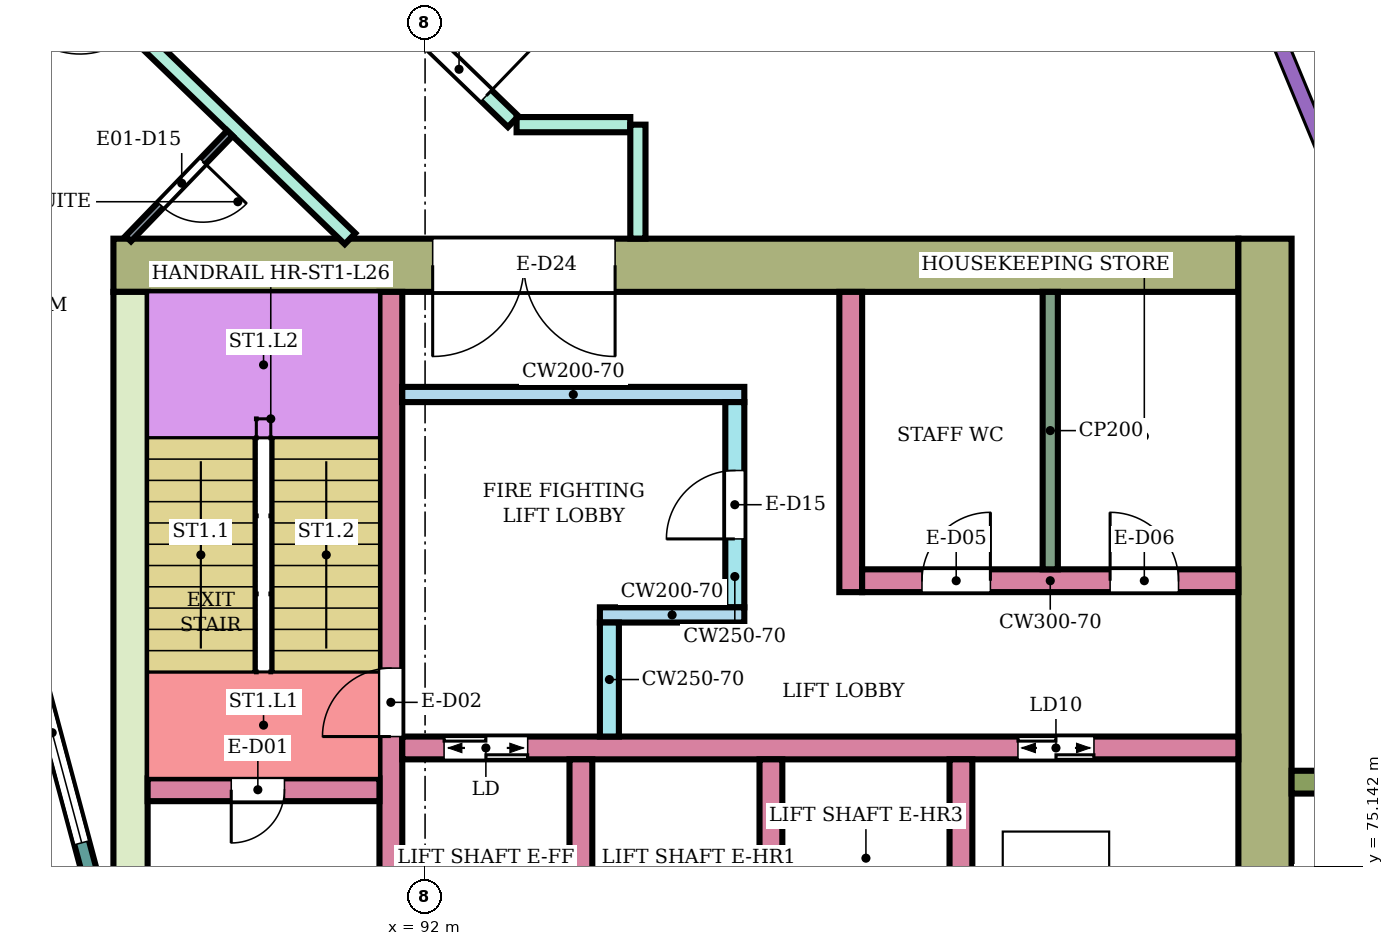
"""IFC4 building model, lengths in metres.
Left out: names, types, materials, properties, quantities, classifications, styles, units other than length and angle.
Written with IfcOpenShell. Run it as: python <this file> out.ifc"""

import sys

from ifc_helpers import new_model, si_unit, direction, frame, frame_2d, origin, place, context, subcontext, project, spatial, rectangle, extrude, element, fill, save


model = new_model("IFC4")
c1 = context("Model", 3, precision=1e-05, world=origin(), true_north=direction((0.0, 1.0)))
c2 = subcontext(c1, "Body", "Model", "MODEL_VIEW")
j1 = project(units=[si_unit("LENGTHUNIT", "METRE"), si_unit("PLANEANGLEUNIT", "RADIAN")], contexts=[c1])
p1 = place(None, origin())
s1 = spatial("IfcSite", under=j1, at=p1, CompositionType="ELEMENT")
p2 = place(p1, origin())
s2 = spatial("IfcBuilding", under=s1, at=p2, CompositionType="ELEMENT")
p3 = place(p2, frame((0.0, 0.0, 114.6)))
s3 = spatial("IfcBuildingStorey", under=s2, at=p3, CompositionType="ELEMENT", Elevation=114.6)
p4 = place(p3, frame((87.9, 83.05, 0.0), z_axis=(0.0, 0.0, 1.0), x_axis=(1.0, 0.0, 0.0)))
e1 = element("IfcWall", 1, at=p4, inside=s3, PredefinedType="SHEAR", context=c2, shape_type="SweptSolid", body=[
    extrude(rectangle(XDim=14.8, YDim=0.7, at=frame_2d((7.4, 0.0))), origin(), (0.0, 0.0, 1.0), 3.58),
])
p5 = place(p4, frame((4.2, 0.0, 0.0)))
e2 = element("IfcOpeningElement", 2, at=p5, cuts=e1, PredefinedType="OPENING", context=c2, shape_type="SweptSolid", body=[
    extrude(rectangle(XDim=2.4, YDim=2.4, at=frame_2d((1.2, 1.2))), frame((0.0, 0.36, 0.0), z_axis=(0.0, -1.0, 0.0), x_axis=(1.0, 0.0, 0.0)), (0.0, 0.0, 1.0), 0.72),
])
p6 = place(p3, frame((88.125, 75.0, 0.0), z_axis=(0.0, 0.0, 1.0), x_axis=(0.0, 1.0, 0.0)))
e3 = element("IfcWall", 3, at=p6, inside=s3, PredefinedType="SHEAR", context=c2, shape_type="SweptSolid", body=[
    extrude(rectangle(XDim=7.7, YDim=0.45, at=frame_2d((3.85, 0.0))), origin(), (0.0, 0.0, 1.0), 3.58),
])
p7 = place(p3, frame((103.05, 66.6, 0.0), z_axis=(0.0, 0.0, 1.0), x_axis=(0.0, 1.0, 0.0)))
e4 = element("IfcWall", 4, at=p7, inside=s3, PredefinedType="SHEAR", context=c2, shape_type="SweptSolid", body=[
    extrude(rectangle(XDim=16.8, YDim=0.7, at=frame_2d((8.4, 0.0))), origin(), (0.0, 0.0, 1.0), 3.58),
])
p8 = place(p3, frame((91.55, 75.0, 0.0), z_axis=(0.0, 0.0, 1.0), x_axis=(0.0, 1.0, 0.0)))
e5 = element("IfcWall", 5, at=p8, inside=s3, PredefinedType="SHEAR", context=c2, shape_type="SweptSolid", body=[
    extrude(rectangle(XDim=7.7, YDim=0.3, at=frame_2d((3.85, 0.0))), origin(), (0.0, 0.0, 1.0), 3.58),
])
p9 = place(p8, frame((1.85, 0.0, 0.0)))
e6 = element("IfcOpeningElement", 6, at=p9, cuts=e5, PredefinedType="OPENING", context=c2, shape_type="SweptSolid", body=[
    extrude(rectangle(XDim=0.9, YDim=2.1, at=frame_2d((0.45, 1.05))), frame((0.0, 0.16, 0.0), z_axis=(0.0, -1.0, 0.0), x_axis=(1.0, 0.0, 0.0)), (0.0, 0.0, 1.0), 0.32),
])
p10 = place(p3, frame((88.35, 76.15, 0.0), z_axis=(0.0, 0.0, 1.0), x_axis=(1.0, 0.0, 0.0)))
e7 = element("IfcWall", 7, at=p10, inside=s3, PredefinedType="SHEAR", context=c2, shape_type="SweptSolid", body=[
    extrude(rectangle(XDim=3.05, YDim=0.3, at=frame_2d((1.525, 0.0))), origin(), (0.0, 0.0, 1.0), 3.58),
])
p11 = place(p10, frame((1.1, 0.0, 0.0)))
e8 = element("IfcOpeningElement", 8, at=p11, cuts=e7, PredefinedType="OPENING", context=c2, shape_type="SweptSolid", body=[
    extrude(rectangle(XDim=0.7, YDim=2.0, at=frame_2d((0.35, 1.0))), frame((0.0, 0.16, 0.0), z_axis=(0.0, -1.0, 0.0), x_axis=(1.0, 0.0, 0.0)), (0.0, 0.0, 1.0), 0.32),
])
p12 = place(p3, frame((91.7, 76.7, 0.0), z_axis=(0.0, 0.0, 1.0), x_axis=(1.0, 0.0, 0.0)))
e9 = element("IfcWall", 9, at=p12, inside=s3, PredefinedType="SHEAR", context=c2, shape_type="SweptSolid", body=[
    extrude(rectangle(XDim=11.0, YDim=0.3, at=frame_2d((5.5, 0.0))), origin(), (0.0, 0.0, 1.0), 3.58),
])
p13 = place(p12, frame((0.55, 0.0, 0.0)))
e10 = element("IfcOpeningElement", 10, at=p13, cuts=e9, PredefinedType="OPENING", context=c2, shape_type="SweptSolid", body=[
    extrude(rectangle(XDim=1.1, YDim=2.1, at=frame_2d((0.55, 1.05))), frame((0.0, 0.16, 0.0), z_axis=(0.0, -1.0, 0.0), x_axis=(1.0, 0.0, 0.0)), (0.0, 0.0, 1.0), 0.32),
])
p14 = place(p12, frame((8.1, 0.0, 0.0)))
e11 = element("IfcOpeningElement", 11, at=p14, cuts=e9, PredefinedType="OPENING", context=c2, shape_type="SweptSolid", body=[
    extrude(rectangle(XDim=1.0, YDim=2.1, at=frame_2d((0.5, 1.05))), frame((0.0, 0.16, 0.0), z_axis=(0.0, -1.0, 0.0), x_axis=(1.0, 0.0, 0.0)), (0.0, 0.0, 1.0), 0.32),
])
for number, where, z_axis, x_axis in (
    (12, (94.05, 74.0, 0.0), (0.0, 0.0, 1.0), (0.0, 1.0, 0.0)),
    (13, (96.55, 74.0, 0.0), (0.0, 0.0, 1.0), (0.0, 1.0, 0.0)),
    (14, (99.05, 74.0, 0.0), (0.0, 0.0, 1.0), (0.0, 1.0, 0.0)),
):
    element("IfcWall", number, at=place(p3, frame(where, z_axis=z_axis, x_axis=x_axis)), inside=s3, PredefinedType="SHEAR", context=c2, shape_type="SweptSolid", body=[
        extrude(rectangle(XDim=2.55, YDim=0.3, at=frame_2d((1.275, 0.0))), origin(), (0.0, 0.0, 1.0), 3.58),
    ])
p15 = place(p3, frame((91.7, 81.35, 0.0), z_axis=(0.0, 0.0, 1.0), x_axis=(1.0, 0.0, 0.0)))
e15 = element("IfcWall", 15, at=p15, inside=s3, PredefinedType="SHEAR", context=c2, shape_type="SweptSolid", body=[
    extrude(rectangle(XDim=4.5, YDim=0.2, at=frame_2d((2.25, 0.0))), origin(), (0.0, 0.0, 1.0), 3.58),
])
p16 = place(p3, frame((96.075, 78.55, 0.0), z_axis=(0.0, 0.0, 1.0), x_axis=(0.0, 1.0, 0.0)))
e16 = element("IfcWall", 16, at=p16, inside=s3, PredefinedType="SHEAR", context=c2, shape_type="SweptSolid", body=[
    extrude(rectangle(XDim=2.7, YDim=0.25, at=frame_2d((1.35, 0.0))), origin(), (0.0, 0.0, 1.0), 3.58),
])
p17 = place(p16, frame((0.9, 0.0, 0.0)))
e17 = element("IfcOpeningElement", 17, at=p17, cuts=e16, PredefinedType="OPENING", context=c2, shape_type="SweptSolid", body=[
    extrude(rectangle(XDim=0.9, YDim=2.1, at=frame_2d((0.45, 1.05))), frame((0.0, 0.135, 0.0), z_axis=(0.0, -1.0, 0.0), x_axis=(1.0, 0.0, 0.0)), (0.0, 0.0, 1.0), 0.27),
])
p18 = place(p3, frame((94.3, 78.45, 0.0), z_axis=(0.0, 0.0, 1.0), x_axis=(1.0, 0.0, 0.0)))
e18 = element("IfcWall", 18, at=p18, inside=s3, PredefinedType="SHEAR", context=c2, shape_type="SweptSolid", body=[
    extrude(rectangle(XDim=1.9, YDim=0.2, at=frame_2d((0.95, 0.0))), origin(), (0.0, 0.0, 1.0), 3.58),
])
p19 = place(p3, frame((94.425, 76.85, 0.0), z_axis=(0.0, 0.0, 1.0), x_axis=(0.0, 1.0, 0.0)))
e19 = element("IfcWall", 19, at=p19, inside=s3, PredefinedType="SHEAR", context=c2, shape_type="SweptSolid", body=[
    extrude(rectangle(XDim=1.5, YDim=0.25, at=frame_2d((0.75, 0.0))), origin(), (0.0, 0.0, 1.0), 3.58),
])
p20 = place(p3, frame((97.6, 78.75, 0.0), z_axis=(0.0, 0.0, 1.0), x_axis=(0.0, 1.0, 0.0)))
e20 = element("IfcWall", 20, at=p20, inside=s3, PredefinedType="SHEAR", context=c2, shape_type="SweptSolid", body=[
    extrude(rectangle(XDim=3.95, YDim=0.3, at=frame_2d((1.975, 0.0))), origin(), (0.0, 0.0, 1.0), 3.58),
])
p21 = place(p3, frame((97.75, 78.9, 0.0), z_axis=(0.0, 0.0, 1.0), x_axis=(1.0, 0.0, 0.0)))
e21 = element("IfcWall", 21, at=p21, inside=s3, PredefinedType="SHEAR", context=c2, shape_type="SweptSolid", body=[
    extrude(rectangle(XDim=4.95, YDim=0.3, at=frame_2d((2.475, 0.0))), origin(), (0.0, 0.0, 1.0), 3.58),
])
p22 = place(p21, frame((0.788, 0.0, 0.0)))
e22 = element("IfcOpeningElement", 22, at=p22, cuts=e21, PredefinedType="OPENING", context=c2, shape_type="SweptSolid", body=[
    extrude(rectangle(XDim=0.9, YDim=2.1, at=frame_2d((0.45, 1.05))), frame((0.0, 0.16, 0.0), z_axis=(0.0, -1.0, 0.0), x_axis=(1.0, 0.0, 0.0)), (0.0, 0.0, 1.0), 0.32),
])
p23 = place(p21, frame((3.262, 0.0, 0.0)))
e23 = element("IfcOpeningElement", 23, at=p23, cuts=e21, PredefinedType="OPENING", context=c2, shape_type="SweptSolid", body=[
    extrude(rectangle(XDim=0.9, YDim=2.1, at=frame_2d((0.45, 1.05))), frame((0.0, 0.16, 0.0), z_axis=(0.0, -1.0, 0.0), x_axis=(1.0, 0.0, 0.0)), (0.0, 0.0, 1.0), 0.32),
])
p24 = place(p3, frame((103.4, 76.25, 0.0), z_axis=(0.0, 0.0, 1.0), x_axis=(1.0, 0.0, 0.0)))
e24 = element("IfcWall", 24, at=p24, inside=s3, PredefinedType="NOTDEFINED", context=c2, shape_type="SweptSolid", body=[
    extrude(rectangle(XDim=2.416, YDim=0.3, at=frame_2d((1.208, 0.0))), origin(), (0.0, 0.0, 1.0), 3.9),
])
p25 = place(p3, frame((87.604, 75.0, 0.0), z_axis=(0.0, 0.0, 1.0), x_axis=(-0.258789828301, 0.965933654434, 0.0)))
e25 = element("IfcWall", 25, at=p25, inside=s3, PredefinedType="NOTDEFINED", context=c2, shape_type="SweptSolid", body=[
    extrude(rectangle(XDim=3.936, YDim=0.2, at=frame_2d((1.968, 0.0))), origin(), (0.0, 0.0, 1.0), 3.9),
])
p26 = place(p25, frame((0.468, 0.0, 0.9)))
e26 = element("IfcOpeningElement", 26, at=p26, cuts=e25, PredefinedType="OPENING", context=c2, shape_type="SweptSolid", body=[
    extrude(rectangle(XDim=3.0, YDim=2.3, at=frame_2d((1.5, 1.15))), frame((0.0, 0.11, 0.0), z_axis=(0.0, -1.0, 0.0), x_axis=(1.0, 0.0, 0.0)), (0.0, 0.0, 1.0), 0.22),
])
p27 = place(p3, frame((87.064, 87.211, 0.0), z_axis=(0.0, 0.0, 1.0), x_axis=(0.719540958932, -0.694450004262, 0.0)))
e27 = element("IfcWall", 27, at=p27, inside=s3, PredefinedType="PARTITIONING", context=c2, shape_type="SweptSolid", body=[
    extrude(rectangle(XDim=5.488, YDim=0.2, at=frame_2d((2.744, 0.0))), origin(), (0.0, 0.0, 1.0), 3.45),
])
p28 = place(p27, frame((0.55, 0.0, 0.0)))
e28 = element("IfcOpeningElement", 28, at=p28, cuts=e27, PredefinedType="OPENING", context=c2, shape_type="SweptSolid", body=[
    extrude(rectangle(XDim=1.0, YDim=2.1, at=frame_2d((0.5, 1.05))), frame((0.0, 0.11, 0.0), z_axis=(0.0, -1.0, 0.0), x_axis=(1.0, 0.0, 0.0)), (0.0, 0.0, 1.0), 0.22),
])
p29 = place(p3, frame((88.466, 89.473, 0.0), z_axis=(0.0, 0.0, 1.0), x_axis=(0.719346014649, -0.694651935295, 0.0)))
e29 = element("IfcWall", 29, at=p29, inside=s3, PredefinedType="PARTITIONING", context=c2, shape_type="SweptSolid", body=[
    extrude(rectangle(XDim=6.525, YDim=0.2, at=frame_2d((3.263, 0.0))), origin(), (0.0, 0.0, 1.0), 3.45),
])
p30 = place(p29, frame((5.034, 0.0, 0.0)))
e30 = element("IfcOpeningElement", 30, at=p30, cuts=e29, PredefinedType="OPENING", context=c2, shape_type="SweptSolid", body=[
    extrude(rectangle(XDim=1.0, YDim=2.1, at=frame_2d((0.5, 1.05))), frame((0.0, 0.11, 0.0), z_axis=(0.0, -1.0, 0.0), x_axis=(1.0, 0.0, 0.0)), (0.0, 0.0, 1.0), 0.22),
])
p31 = place(p3, frame((93.204, 84.9, 0.0), z_axis=(0.0, 0.0, 1.0), x_axis=(1.0, 0.0, 0.0)))
e31 = element("IfcWall", 31, at=p31, inside=s3, PredefinedType="PARTITIONING", context=c2, shape_type="SweptSolid", body=[
    extrude(rectangle(XDim=1.496, YDim=0.2, at=frame_2d((0.748, 0.0))), origin(), (0.0, 0.0, 1.0), 3.45),
])
p32 = place(p3, frame((94.8, 83.401, 0.0), z_axis=(0.0, 0.0, 1.0), x_axis=(0.0, 1.0, 0.0)))
e32 = element("IfcWall", 32, at=p32, inside=s3, PredefinedType="PARTITIONING", context=c2, shape_type="SweptSolid", body=[
    extrude(rectangle(XDim=1.499, YDim=0.2, at=frame_2d((0.75, 0.0))), origin(), (0.0, 0.0, 1.0), 3.45),
])
p33 = place(p3, frame((88.095, 83.4, 0.0), z_axis=(0.0, 0.0, 1.0), x_axis=(0.694447472534, 0.719543402368, 0.0)))
e33 = element("IfcWall", 33, at=p33, inside=s3, PredefinedType="PARTITIONING", context=c2, shape_type="SweptSolid", body=[
    extrude(rectangle(XDim=1.926, YDim=0.1, at=frame_2d((0.963, 0.0))), origin(), (0.0, 0.0, 1.0), 3.45),
])
p34 = place(p33, frame((0.613, 0.0, 0.0)))
e34 = element("IfcOpeningElement", 34, at=p34, cuts=e33, PredefinedType="OPENING", context=c2, shape_type="SweptSolid", body=[
    extrude(rectangle(XDim=0.8, YDim=2.1, at=frame_2d((0.4, 1.05))), frame((0.0, 0.06, 0.0), z_axis=(0.0, -1.0, 0.0), x_axis=(1.0, 0.0, 0.0)), (0.0, 0.0, 1.0), 0.12),
])
p35 = place(p3, frame((100.225, 79.05, 0.0), z_axis=(0.0, 0.0, 1.0), x_axis=(0.0, 1.0, 0.0)))
e35 = element("IfcWall", 35, at=p35, inside=s3, PredefinedType="PARTITIONING", context=c2, shape_type="SweptSolid", body=[
    extrude(rectangle(XDim=3.65, YDim=0.2, at=frame_2d((1.825, 0.0))), origin(), (0.0, 0.0, 1.0), 3.58),
])
p36 = place(p26, origin())
e36 = element("IfcWindow", 36, at=p36, inside=s3, PartitioningType="SINGLE_PANEL", PredefinedType="WINDOW", context=c2, shape_type="SweptSolid", body=[
    extrude(rectangle(XDim=3.0, YDim=2.3, at=frame_2d((1.5, 1.15))), frame((0.0, 0.03, 0.0), z_axis=(0.0, -1.0, 0.0), x_axis=(1.0, 0.0, 0.0)), (0.0, 0.0, 1.0), 0.06),
])
fill(e26, e36)
p37 = place(p30, origin())
e37 = element("IfcDoor", 37, at=p37, inside=s3, OperationType="SINGLE_SWING_RIGHT", PredefinedType="DOOR", context=c2, shape_type="SweptSolid", body=[
    extrude(rectangle(XDim=1.0, YDim=2.1, at=frame_2d((0.5, 1.05))), frame((0.0, 0.025, 0.0), z_axis=(0.0, -1.0, 0.0), x_axis=(1.0, 0.0, 0.0)), (0.0, 0.0, 1.0), 0.05),
])
fill(e30, e37)
p38 = place(p34, frame((0.8, 0.0, 0.0), z_axis=(0.0, 0.0, 1.0), x_axis=(-1.0, 0.0, 0.0)))
e38 = element("IfcDoor", 38, at=p38, inside=s3, OperationType="SINGLE_SWING_LEFT", PredefinedType="DOOR", context=c2, shape_type="SweptSolid", body=[
    extrude(rectangle(XDim=0.8, YDim=2.1, at=frame_2d((0.4, 1.05))), frame((0.0, 0.025, 0.0), z_axis=(0.0, -1.0, 0.0), x_axis=(1.0, 0.0, 0.0)), (0.0, 0.0, 1.0), 0.05),
])
fill(e34, e38)
p39 = place(p11, frame((0.7, 0.0, 0.0), z_axis=(0.0, 0.0, 1.0), x_axis=(-1.0, 0.0, 0.0)))
e39 = element("IfcDoor", 39, at=p39, inside=s3, OperationType="SINGLE_SWING_RIGHT", PredefinedType="DOOR", context=c2, shape_type="SweptSolid", body=[
    extrude(rectangle(XDim=0.7, YDim=2.0, at=frame_2d((0.35, 1.0))), frame((0.0, 0.025, 0.0), z_axis=(0.0, -1.0, 0.0), x_axis=(1.0, 0.0, 0.0)), (0.0, 0.0, 1.0), 0.05),
])
fill(e8, e39)
p40 = place(p9, origin())
e40 = element("IfcDoor", 40, at=p40, inside=s3, OperationType="SINGLE_SWING_LEFT", PredefinedType="DOOR", context=c2, shape_type="SweptSolid", body=[
    extrude(rectangle(XDim=0.9, YDim=2.1, at=frame_2d((0.45, 1.05))), frame((0.0, 0.025, 0.0), z_axis=(0.0, -1.0, 0.0), x_axis=(1.0, 0.0, 0.0)), (0.0, 0.0, 1.0), 0.05),
])
fill(e6, e40)
p41 = place(p13, origin())
e41 = element("IfcDoor", 41, at=p41, inside=s3, OperationType="DOUBLE_DOOR_SLIDING", PredefinedType="DOOR", context=c2, shape_type="SweptSolid", body=[
    extrude(rectangle(XDim=1.1, YDim=2.1, at=frame_2d((0.55, 1.05))), frame((0.0, 0.025, 0.0), z_axis=(0.0, -1.0, 0.0), x_axis=(1.0, 0.0, 0.0)), (0.0, 0.0, 1.0), 0.05),
])
fill(e10, e41)
p42 = place(p14, origin())
e42 = element("IfcDoor", 42, at=p42, inside=s3, OperationType="DOUBLE_DOOR_SLIDING", PredefinedType="DOOR", context=c2, shape_type="SweptSolid", body=[
    extrude(rectangle(XDim=1.0, YDim=2.1, at=frame_2d((0.5, 1.05))), frame((0.0, 0.025, 0.0), z_axis=(0.0, -1.0, 0.0), x_axis=(1.0, 0.0, 0.0)), (0.0, 0.0, 1.0), 0.05),
])
fill(e11, e42)
p43 = place(p17, origin())
e43 = element("IfcDoor", 43, at=p43, inside=s3, OperationType="SINGLE_SWING_LEFT", PredefinedType="DOOR", context=c2, shape_type="SweptSolid", body=[
    extrude(rectangle(XDim=0.9, YDim=2.1, at=frame_2d((0.45, 1.05))), frame((0.0, 0.025, 0.0), z_axis=(0.0, -1.0, 0.0), x_axis=(1.0, 0.0, 0.0)), (0.0, 0.0, 1.0), 0.05),
])
fill(e17, e43)
p44 = place(p22, origin())
e44 = element("IfcDoor", 44, at=p44, inside=s3, OperationType="SINGLE_SWING_RIGHT", PredefinedType="DOOR", context=c2, shape_type="SweptSolid", body=[
    extrude(rectangle(XDim=0.9, YDim=2.1, at=frame_2d((0.45, 1.05))), frame((0.0, 0.025, 0.0), z_axis=(0.0, -1.0, 0.0), x_axis=(1.0, 0.0, 0.0)), (0.0, 0.0, 1.0), 0.05),
])
fill(e22, e44)
p45 = place(p23, origin())
e45 = element("IfcDoor", 45, at=p45, inside=s3, OperationType="SINGLE_SWING_LEFT", PredefinedType="DOOR", context=c2, shape_type="SweptSolid", body=[
    extrude(rectangle(XDim=0.9, YDim=2.1, at=frame_2d((0.45, 1.05))), frame((0.0, 0.025, 0.0), z_axis=(0.0, -1.0, 0.0), x_axis=(1.0, 0.0, 0.0)), (0.0, 0.0, 1.0), 0.05),
])
fill(e23, e45)
p46 = place(p5, frame((2.4, 0.0, 0.0), z_axis=(0.0, 0.0, 1.0), x_axis=(-1.0, 0.0, 0.0)))
e46 = element("IfcDoor", 46, at=p46, inside=s3, OperationType="DOUBLE_DOOR_SINGLE_SWING", PredefinedType="DOOR", context=c2, shape_type="SweptSolid", body=[
    extrude(rectangle(XDim=2.4, YDim=2.4, at=frame_2d((1.2, 1.2))), frame((0.0, 0.025, 0.0), z_axis=(0.0, -1.0, 0.0), x_axis=(1.0, 0.0, 0.0)), (0.0, 0.0, 1.0), 0.05),
])
fill(e2, e46)
save(model, sys.argv[1])
